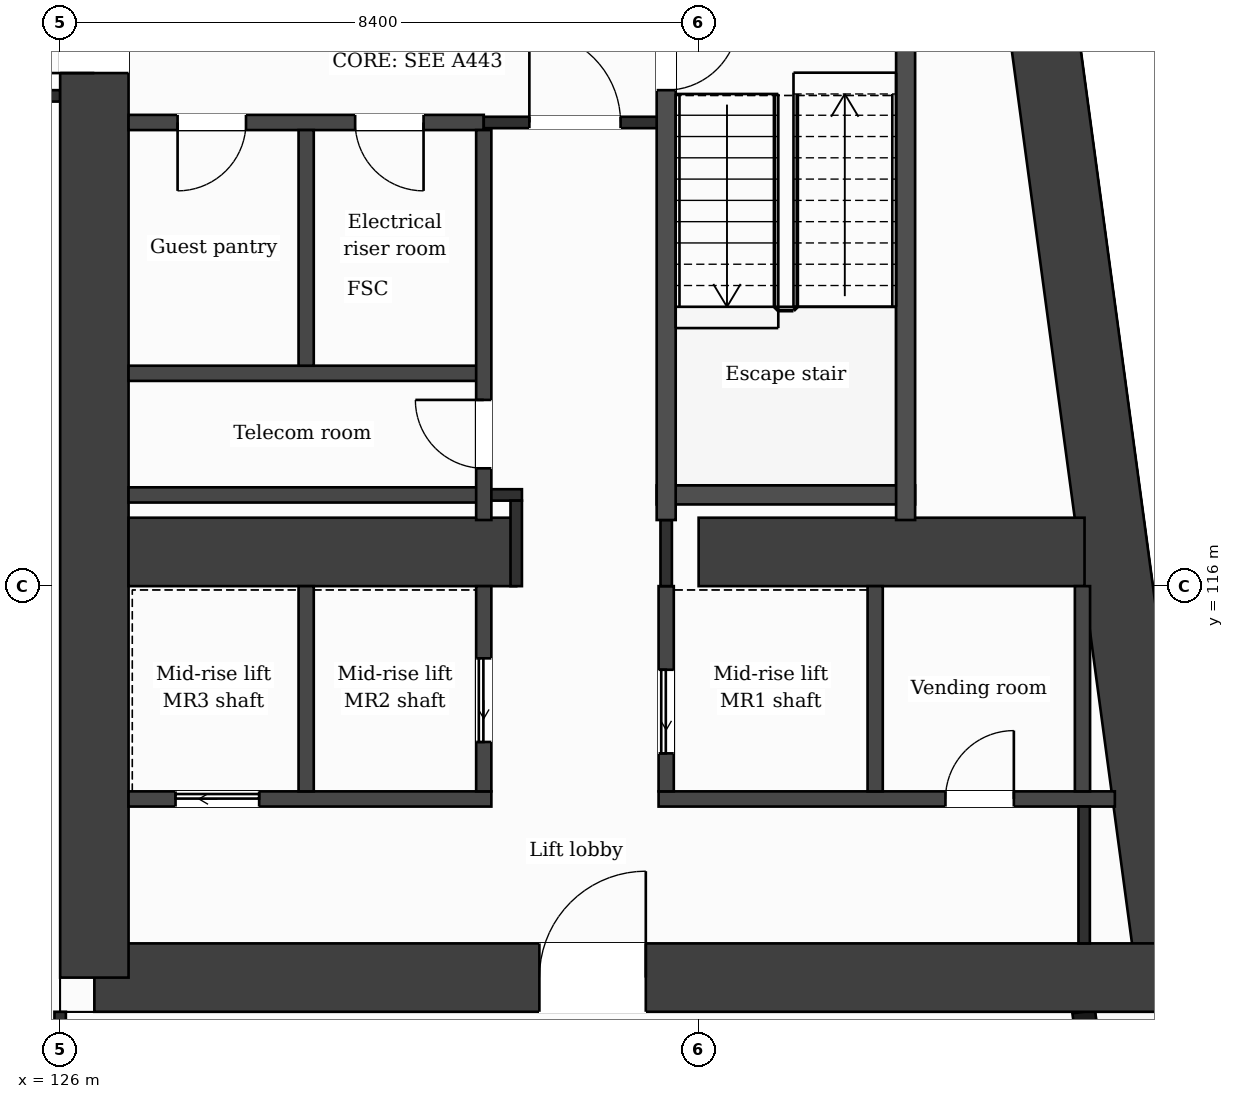
"""IFC4 building model, lengths in metres.
Left out: names, types, materials, properties, quantities, classifications, styles, units other than length and angle.
Written with IfcOpenShell. Run it as: python <this file> out.ifc"""

import sys

from ifc_helpers import new_model, si_unit, direction, frame, frame_2d, origin, place, context, subcontext, project, spatial, rectangle, extrude, element, fill, save


model = new_model("IFC4")
c1 = context("Model", 3, precision=1e-05, world=origin(), true_north=direction((0.0, 1.0)))
c2 = subcontext(c1, "Body", "Model", "MODEL_VIEW")
j1 = project(units=[si_unit("LENGTHUNIT", "METRE"), si_unit("PLANEANGLEUNIT", "RADIAN")], contexts=[c1])
p1 = place(None, origin())
s1 = spatial("IfcSite", under=j1, at=p1, CompositionType="ELEMENT")
p2 = place(p1, origin())
s2 = spatial("IfcBuilding", under=s1, at=p2, CompositionType="ELEMENT")
p3 = place(p2, frame((0.0, 0.0, 177.4)))
s3 = spatial("IfcBuildingStorey", under=s2, at=p3, CompositionType="ELEMENT", Elevation=177.4)
p4 = place(p3, frame((137.776, 131.95, 0.0), z_axis=(0.0, 0.0, 1.0), x_axis=(0.133421759112, -0.991059349482, 0.0)))
e1 = element("IfcWall", 1, at=p4, inside=s3, PredefinedType="SHEAR", context=c2, shape_type="SweptSolid", body=[
    extrude(rectangle(XDim=21.29, YDim=0.9, at=frame_2d((10.645, 0.0))), origin(), (0.0, 0.0, 1.0), 3.7),
])
p5 = place(p3, frame((140.616, 110.85, 0.0), z_axis=(0.0, 0.0, 1.0), x_axis=(-1.0, 0.0, 0.0)))
e2 = element("IfcWall", 2, at=p5, inside=s3, PredefinedType="SHEAR", context=c2, shape_type="SweptSolid", body=[
    extrude(rectangle(XDim=14.166, YDim=0.9, at=frame_2d((7.083, 0.0))), origin(), (0.0, 0.0, 1.0), 3.7),
])
p6 = place(p5, frame((6.911, 0.0, 0.0)))
e3 = element("IfcOpeningElement", 3, at=p6, cuts=e2, PredefinedType="OPENING", context=c2, shape_type="SweptSolid", body=[
    extrude(rectangle(XDim=1.4, YDim=2.1, at=frame_2d((0.7, 1.05))), frame((0.0, 0.46, 0.0), z_axis=(0.0, -1.0, 0.0), x_axis=(1.0, 0.0, 0.0)), (0.0, 0.0, 1.0), 0.92),
])
p7 = place(p3, frame((126.45, 110.85, 0.0), z_axis=(0.0, 0.0, 1.0), x_axis=(0.0, 1.0, 0.0)))
e4 = element("IfcWall", 4, at=p7, inside=s3, PredefinedType="SHEAR", context=c2, shape_type="SweptSolid", body=[
    extrude(rectangle(XDim=21.1, YDim=0.9, at=frame_2d((10.55, 0.0))), origin(), (0.0, 0.0, 1.0), 3.7),
])
p8 = place(p7, frame((11.9, 0.0, 0.0)))
e5 = element("IfcOpeningElement", 5, at=p8, cuts=e4, PredefinedType="OPENING", context=c2, shape_type="SweptSolid", body=[
    extrude(rectangle(XDim=1.4, YDim=2.1, at=frame_2d((0.7, 1.05))), frame((0.0, 0.46, 0.0), z_axis=(0.0, -1.0, 0.0), x_axis=(1.0, 0.0, 0.0)), (0.0, 0.0, 1.0), 0.92),
])
p9 = place(p3, frame((126.9, 116.45, 0.0), z_axis=(0.0, 0.0, 1.0), x_axis=(1.0, 0.0, 0.0)))
e6 = element("IfcWall", 6, at=p9, inside=s3, PredefinedType="SHEAR", context=c2, shape_type="SweptSolid", body=[
    extrude(rectangle(XDim=5.1, YDim=0.9, at=frame_2d((2.55, 0.0))), origin(), (0.0, 0.0, 1.0), 3.7),
])
p10 = place(p3, frame((134.4, 116.45, 0.0), z_axis=(0.0, 0.0, 1.0), x_axis=(1.0, 0.0, 0.0)))
e7 = element("IfcWall", 7, at=p10, inside=s3, PredefinedType="SHEAR", context=c2, shape_type="SweptSolid", body=[
    extrude(rectangle(XDim=5.077, YDim=0.9, at=frame_2d((2.539, 0.0))), origin(), (0.0, 0.0, 1.0), 3.7),
])
p11 = place(p3, frame((140.348, 103.85, 0.0), z_axis=(0.0, 0.0, 1.0), x_axis=(-0.133431549479, 0.991058031401, 0.0)))
e8 = element("IfcWall", 8, at=p11, inside=s3, PredefinedType="SOLIDWALL", context=c2, shape_type="SweptSolid", body=[
    extrude(rectangle(XDim=6.609, YDim=0.3, at=frame_2d((3.304, 0.0))), origin(), (0.0, 0.0, 1.0), 3.38),
])
p12 = place(p11, frame((0.737, 0.0, 0.9)))
e9 = element("IfcOpeningElement", 9, at=p12, cuts=e8, PredefinedType="OPENING", context=c2, shape_type="SweptSolid", body=[
    extrude(rectangle(XDim=1.2, YDim=2.1, at=frame_2d((0.6, 1.05))), frame((0.0, 0.16, 0.0), z_axis=(0.0, -1.0, 0.0), x_axis=(1.0, 0.0, 0.0)), (0.0, 0.0, 1.0), 0.32),
])
p13 = place(p11, frame((3.991, 0.0, 0.0)))
e10 = element("IfcOpeningElement", 10, at=p13, cuts=e8, PredefinedType="OPENING", context=c2, shape_type="SweptSolid", body=[
    extrude(rectangle(XDim=1.2, YDim=2.4, at=frame_2d((0.6, 1.2))), frame((0.0, 0.16, 0.0), z_axis=(0.0, -1.0, 0.0), x_axis=(1.0, 0.0, 0.0)), (0.0, 0.0, 1.0), 0.32),
])
p14 = place(p3, frame((126.9, 113.2, 0.0), z_axis=(0.0, 0.0, 1.0), x_axis=(1.0, 0.0, 0.0)))
e11 = element("IfcWall", 11, at=p14, inside=s3, PredefinedType="PARTITIONING", context=c2, shape_type="SweptSolid", body=[
    extrude(rectangle(XDim=4.773, YDim=0.2, at=frame_2d((2.387, 0.0))), origin(), (0.0, 0.0, 1.0), 3.38),
])
p15 = place(p14, frame((0.618, 0.0, 0.0)))
e12 = element("IfcOpeningElement", 12, at=p15, cuts=e11, PredefinedType="OPENING", context=c2, shape_type="SweptSolid", body=[
    extrude(rectangle(XDim=1.1, YDim=2.1, at=frame_2d((0.55, 1.05))), frame((0.0, 0.11, 0.0), z_axis=(0.0, -1.0, 0.0), x_axis=(1.0, 0.0, 0.0)), (0.0, 0.0, 1.0), 0.22),
])
p16 = place(p3, frame((133.873, 113.2, 0.0), z_axis=(0.0, 0.0, 1.0), x_axis=(1.0, 0.0, 0.0)))
e13 = element("IfcWall", 13, at=p16, inside=s3, PredefinedType="PARTITIONING", context=c2, shape_type="SweptSolid", body=[
    extrude(rectangle(XDim=6.003, YDim=0.2, at=frame_2d((3.001, 0.0))), origin(), (0.0, 0.0, 1.0), 3.38),
])
p17 = place(p16, frame((3.774, 0.0, 0.0)))
e14 = element("IfcOpeningElement", 14, at=p17, cuts=e13, PredefinedType="OPENING", context=c2, shape_type="SweptSolid", body=[
    extrude(rectangle(XDim=0.9, YDim=2.1, at=frame_2d((0.45, 1.05))), frame((0.0, 0.11, 0.0), z_axis=(0.0, -1.0, 0.0), x_axis=(1.0, 0.0, 0.0)), (0.0, 0.0, 1.0), 0.22),
])
p18 = place(p3, frame((126.9, 117.2, 0.0), z_axis=(0.0, 0.0, 1.0), x_axis=(1.0, 0.0, 0.0)))
e15 = element("IfcWall", 15, at=p18, inside=s3, PredefinedType="PARTITIONING", context=c2, shape_type="SweptSolid", body=[
    extrude(rectangle(XDim=4.673, YDim=0.2, at=frame_2d((2.336, 0.0))), origin(), (0.0, 0.0, 1.0), 3.38),
])
p19 = place(p3, frame((131.573, 117.2, 0.0), z_axis=(0.0, 0.0, 1.0), x_axis=(1.0, 0.0, 0.0)))
e16 = element("IfcWall", 16, at=p19, inside=s3, PredefinedType="PARTITIONING", context=c2, shape_type="SweptSolid", body=[
    extrude(rectangle(XDim=0.502, YDim=0.15, at=frame_2d((0.251, 0.0))), origin(), (0.0, 0.0, 1.0), 3.38),
])
p20 = place(p3, frame((133.848, 117.2, 0.0), z_axis=(0.0, 0.0, 1.0), x_axis=(1.0, 0.0, 0.0)))
e17 = element("IfcWall", 17, at=p20, inside=s3, PredefinedType="PARTITIONING", context=c2, shape_type="SweptSolid", body=[
    extrude(rectangle(XDim=3.4, YDim=0.25, at=frame_2d((1.7, 0.0))), origin(), (0.0, 0.0, 1.0), 3.38),
])
p21 = place(p3, frame((126.9, 118.8, 0.0), z_axis=(0.0, 0.0, 1.0), x_axis=(1.0, 0.0, 0.0)))
e18 = element("IfcWall", 18, at=p21, inside=s3, PredefinedType="PARTITIONING", context=c2, shape_type="SweptSolid", body=[
    extrude(rectangle(XDim=4.673, YDim=0.2, at=frame_2d((2.336, 0.0))), origin(), (0.0, 0.0, 1.0), 3.38),
])
p22 = place(p3, frame((126.9, 122.1, 0.0), z_axis=(0.0, 0.0, 1.0), x_axis=(1.0, 0.0, 0.0)))
e19 = element("IfcWall", 19, at=p22, inside=s3, PredefinedType="PARTITIONING", context=c2, shape_type="SweptSolid", body=[
    extrude(rectangle(XDim=4.673, YDim=0.2, at=frame_2d((2.336, 0.0))), origin(), (0.0, 0.0, 1.0), 3.38),
])
p23 = place(p22, frame((2.981, 0.0, 0.0)))
e20 = element("IfcOpeningElement", 20, at=p23, cuts=e19, PredefinedType="OPENING", context=c2, shape_type="SweptSolid", body=[
    extrude(rectangle(XDim=0.9, YDim=2.1, at=frame_2d((0.45, 1.05))), frame((0.0, 0.11, 0.0), z_axis=(0.0, -1.0, 0.0), x_axis=(1.0, 0.0, 0.0)), (0.0, 0.0, 1.0), 0.22),
])
p24 = place(p22, frame((0.645, 0.0, 0.0)))
e21 = element("IfcOpeningElement", 21, at=p24, cuts=e19, PredefinedType="OPENING", context=c2, shape_type="SweptSolid", body=[
    extrude(rectangle(XDim=0.9, YDim=2.1, at=frame_2d((0.45, 1.05))), frame((0.0, 0.11, 0.0), z_axis=(0.0, -1.0, 0.0), x_axis=(1.0, 0.0, 0.0)), (0.0, 0.0, 1.0), 0.22),
])
p25 = place(p3, frame((131.573, 122.1, 0.0), z_axis=(0.0, 0.0, 1.0), x_axis=(1.0, 0.0, 0.0)))
e22 = element("IfcWall", 22, at=p25, inside=s3, PredefinedType="PARTITIONING", context=c2, shape_type="SweptSolid", body=[
    extrude(rectangle(XDim=2.4, YDim=0.15, at=frame_2d((1.2, 0.0))), origin(), (0.0, 0.0, 1.0), 3.38),
])
p26 = place(p25, frame((0.6, 0.0, 0.0)))
e23 = element("IfcOpeningElement", 23, at=p26, cuts=e22, PredefinedType="OPENING", context=c2, shape_type="SweptSolid", body=[
    extrude(rectangle(XDim=1.2, YDim=2.1, at=frame_2d((0.6, 1.05))), frame((0.0, 0.085, 0.0), z_axis=(0.0, -1.0, 0.0), x_axis=(1.0, 0.0, 0.0)), (0.0, 0.0, 1.0), 0.17),
])
p27 = place(p3, frame((100.8, 122.45, 0.0), z_axis=(0.0, 0.0, 1.0), x_axis=(1.0, 0.0, 0.0)))
e24 = element("IfcWall", 24, at=p27, inside=s3, PredefinedType="PARTITIONING", context=c2, shape_type="SweptSolid", body=[
    extrude(rectangle(XDim=25.2, YDim=0.15, at=frame_2d((12.6, 0.0))), origin(), (0.0, 0.0, 1.0), 3.38),
])
p28 = place(p3, frame((126.0, 109.075, 0.0), z_axis=(0.0, 0.0, 1.0), x_axis=(0.0, 1.0, 0.0)))
e25 = element("IfcWall", 25, at=p28, inside=s3, PredefinedType="PARTITIONING", context=c2, shape_type="SweptSolid", body=[
    extrude(rectangle(XDim=1.325, YDim=0.15, at=frame_2d((0.663, 0.0))), origin(), (0.0, 0.0, 1.0), 3.38),
])
p29 = place(p3, frame((129.237, 113.3, 0.0), z_axis=(0.0, 0.0, 1.0), x_axis=(0.0, 1.0, 0.0)))
e26 = element("IfcWall", 26, at=p29, inside=s3, PredefinedType="PARTITIONING", context=c2, shape_type="SweptSolid", body=[
    extrude(rectangle(XDim=2.7, YDim=0.2, at=frame_2d((1.35, 0.0))), origin(), (0.0, 0.0, 1.0), 3.38),
])
p30 = place(p3, frame((129.237, 118.9, 0.0), z_axis=(0.0, 0.0, 1.0), x_axis=(0.0, 1.0, 0.0)))
e27 = element("IfcWall", 27, at=p30, inside=s3, PredefinedType="PARTITIONING", context=c2, shape_type="SweptSolid", body=[
    extrude(rectangle(XDim=3.1, YDim=0.2, at=frame_2d((1.55, 0.0))), origin(), (0.0, 0.0, 1.0), 3.38),
])
p31 = place(p3, frame((131.573, 113.3, 0.0), z_axis=(0.0, 0.0, 1.0), x_axis=(0.0, 1.0, 0.0)))
e28 = element("IfcWall", 28, at=p31, inside=s3, PredefinedType="PARTITIONING", context=c2, shape_type="SweptSolid", body=[
    extrude(rectangle(XDim=2.7, YDim=0.2, at=frame_2d((1.35, 0.0))), origin(), (0.0, 0.0, 1.0), 3.38),
])
p32 = place(p31, frame((0.65, 0.0, 0.0)))
e29 = element("IfcOpeningElement", 29, at=p32, cuts=e28, PredefinedType="OPENING", context=c2, shape_type="SweptSolid", body=[
    extrude(rectangle(XDim=1.1, YDim=2.1, at=frame_2d((0.55, 1.05))), frame((0.0, 0.11, 0.0), z_axis=(0.0, -1.0, 0.0), x_axis=(1.0, 0.0, 0.0)), (0.0, 0.0, 1.0), 0.22),
])
p33 = place(p3, frame((131.573, 116.87, 0.0), z_axis=(0.0, 0.0, 1.0), x_axis=(0.0, 1.0, 0.0)))
e30 = element("IfcWall", 30, at=p33, inside=s3, PredefinedType="PARTITIONING", context=c2, shape_type="SweptSolid", body=[
    extrude(rectangle(XDim=5.13, YDim=0.2, at=frame_2d((2.565, 0.0))), origin(), (0.0, 0.0, 1.0), 3.38),
])
p34 = place(p33, frame((0.68, 0.0, 0.0)))
e31 = element("IfcOpeningElement", 31, at=p34, cuts=e30, PredefinedType="OPENING", context=c2, shape_type="SweptSolid", body=[
    extrude(rectangle(XDim=0.9, YDim=2.1, at=frame_2d((0.45, 1.05))), frame((0.0, 0.11, 0.0), z_axis=(0.0, -1.0, 0.0), x_axis=(1.0, 0.0, 0.0)), (0.0, 0.0, 1.0), 0.22),
])
p35 = place(p3, frame((132.0, 116.0, 0.0), z_axis=(0.0, 0.0, 1.0), x_axis=(0.0, 1.0, 0.0)))
e32 = element("IfcWall", 32, at=p35, inside=s3, PredefinedType="PARTITIONING", context=c2, shape_type="SweptSolid", body=[
    extrude(rectangle(XDim=1.125, YDim=0.15, at=frame_2d((0.562, 0.0))), origin(), (0.0, 0.0, 1.0), 3.38),
])
p36 = place(p3, frame((133.973, 113.3, 0.0), z_axis=(0.0, 0.0, 1.0), x_axis=(0.0, 1.0, 0.0)))
e33 = element("IfcWall", 33, at=p36, inside=s3, PredefinedType="PARTITIONING", context=c2, shape_type="SweptSolid", body=[
    extrude(rectangle(XDim=2.7, YDim=0.2, at=frame_2d((1.35, 0.0))), origin(), (0.0, 0.0, 1.0), 3.38),
])
p37 = place(p36, frame((0.5, 0.0, 0.0)))
e34 = element("IfcOpeningElement", 34, at=p37, cuts=e33, PredefinedType="OPENING", context=c2, shape_type="SweptSolid", body=[
    extrude(rectangle(XDim=1.1, YDim=2.1, at=frame_2d((0.55, 1.05))), frame((0.0, 0.11, 0.0), z_axis=(0.0, -1.0, 0.0), x_axis=(1.0, 0.0, 0.0)), (0.0, 0.0, 1.0), 0.22),
])
p38 = place(p3, frame((133.973, 116.0, 0.0), z_axis=(0.0, 0.0, 1.0), x_axis=(0.0, 1.0, 0.0)))
e35 = element("IfcWall", 35, at=p38, inside=s3, PredefinedType="PARTITIONING", context=c2, shape_type="SweptSolid", body=[
    extrude(rectangle(XDim=0.87, YDim=0.15, at=frame_2d((0.435, 0.0))), origin(), (0.0, 0.0, 1.0), 3.38),
])
p39 = place(p3, frame((133.973, 116.87, 0.0), z_axis=(0.0, 0.0, 1.0), x_axis=(0.0, 1.0, 0.0)))
e36 = element("IfcWall", 36, at=p39, inside=s3, PredefinedType="PARTITIONING", context=c2, shape_type="SweptSolid", body=[
    extrude(rectangle(XDim=6.955, YDim=0.25, at=frame_2d((3.478, 0.0))), origin(), (0.0, 0.0, 1.0), 3.38),
])
p40 = place(p39, frame((5.655, 0.0, 0.0)))
e37 = element("IfcOpeningElement", 37, at=p40, cuts=e36, PredefinedType="OPENING", context=c2, shape_type="SweptSolid", body=[
    extrude(rectangle(XDim=0.95, YDim=2.1, at=frame_2d((0.475, 1.05))), frame((0.0, 0.135, 0.0), z_axis=(0.0, -1.0, 0.0), x_axis=(1.0, 0.0, 0.0)), (0.0, 0.0, 1.0), 0.27),
])
p41 = place(p3, frame((136.722, 113.3, 0.0), z_axis=(0.0, 0.0, 1.0), x_axis=(0.0, 1.0, 0.0)))
e38 = element("IfcWall", 38, at=p41, inside=s3, PredefinedType="PARTITIONING", context=c2, shape_type="SweptSolid", body=[
    extrude(rectangle(XDim=2.7, YDim=0.2, at=frame_2d((1.35, 0.0))), origin(), (0.0, 0.0, 1.0), 3.38),
])
p42 = place(p3, frame((137.123, 116.87, 0.0), z_axis=(0.0, 0.0, 1.0), x_axis=(0.0, 1.0, 0.0)))
e39 = element("IfcWall", 39, at=p42, inside=s3, PredefinedType="PARTITIONING", context=c2, shape_type="SweptSolid", body=[
    extrude(rectangle(XDim=6.955, YDim=0.25, at=frame_2d((3.478, 0.0))), origin(), (0.0, 0.0, 1.0), 3.38),
])
p43 = place(p3, frame((139.45, 113.3, 0.0), z_axis=(0.0, 0.0, 1.0), x_axis=(0.0, 1.0, 0.0)))
e40 = element("IfcWall", 40, at=p43, inside=s3, PredefinedType="PARTITIONING", context=c2, shape_type="SweptSolid", body=[
    extrude(rectangle(XDim=2.7, YDim=0.2, at=frame_2d((1.35, 0.0))), origin(), (0.0, 0.0, 1.0), 3.38),
])
p44 = place(p3, frame((139.472, 111.3, 0.0), z_axis=(0.0, 0.0, 1.0), x_axis=(0.0, 1.0, 0.0)))
e41 = element("IfcWall", 41, at=p44, inside=s3, PredefinedType="PARTITIONING", context=c2, shape_type="SweptSolid", body=[
    extrude(rectangle(XDim=1.8, YDim=0.15, at=frame_2d((0.9, 0.0))), origin(), (0.0, 0.0, 1.0), 3.38),
])
p45 = place(p26, origin())
e42 = element("IfcDoor", 42, at=p45, inside=s3, OperationType="SINGLE_SWING_LEFT", PredefinedType="DOOR", context=c2, shape_type="SweptSolid", body=[
    extrude(rectangle(XDim=1.2, YDim=2.1, at=frame_2d((0.6, 1.05))), frame((0.0, 0.025, 0.0), z_axis=(0.0, -1.0, 0.0), x_axis=(1.0, 0.0, 0.0)), (0.0, 0.0, 1.0), 0.05),
])
fill(e23, e42)
p46 = place(p23, origin())
e43 = element("IfcDoor", 43, at=p46, inside=s3, OperationType="SINGLE_SWING_RIGHT", PredefinedType="DOOR", context=c2, shape_type="SweptSolid", body=[
    extrude(rectangle(XDim=0.9, YDim=2.1, at=frame_2d((0.45, 1.05))), frame((0.0, 0.025, 0.0), z_axis=(0.0, -1.0, 0.0), x_axis=(1.0, 0.0, 0.0)), (0.0, 0.0, 1.0), 0.05),
])
fill(e20, e43)
p47 = place(p24, origin())
e44 = element("IfcDoor", 44, at=p47, inside=s3, OperationType="SINGLE_SWING_LEFT", PredefinedType="DOOR", context=c2, shape_type="SweptSolid", body=[
    extrude(rectangle(XDim=0.9, YDim=2.1, at=frame_2d((0.45, 1.05))), frame((0.0, 0.025, 0.0), z_axis=(0.0, -1.0, 0.0), x_axis=(1.0, 0.0, 0.0)), (0.0, 0.0, 1.0), 0.05),
])
fill(e21, e44)
p48 = place(p40, origin())
e45 = element("IfcDoor", 45, at=p48, inside=s3, OperationType="SINGLE_SWING_RIGHT", PredefinedType="DOOR", context=c2, shape_type="SweptSolid", body=[
    extrude(rectangle(XDim=0.95, YDim=2.1, at=frame_2d((0.475, 1.05))), frame((0.0, 0.025, 0.0), z_axis=(0.0, -1.0, 0.0), x_axis=(1.0, 0.0, 0.0)), (0.0, 0.0, 1.0), 0.05),
])
fill(e37, e45)
p49 = place(p34, origin())
e46 = element("IfcDoor", 46, at=p49, inside=s3, OperationType="SINGLE_SWING_RIGHT", PredefinedType="DOOR", context=c2, shape_type="SweptSolid", body=[
    extrude(rectangle(XDim=0.9, YDim=2.1, at=frame_2d((0.45, 1.05))), frame((0.0, 0.025, 0.0), z_axis=(0.0, -1.0, 0.0), x_axis=(1.0, 0.0, 0.0)), (0.0, 0.0, 1.0), 0.05),
])
fill(e31, e46)
p50 = place(p37, origin())
e47 = element("IfcDoor", 47, at=p50, inside=s3, OperationType="SLIDING_TO_LEFT", PredefinedType="DOOR", context=c2, shape_type="SweptSolid", body=[
    extrude(rectangle(XDim=1.1, YDim=2.1, at=frame_2d((0.55, 1.05))), frame((0.0, 0.025, 0.0), z_axis=(0.0, -1.0, 0.0), x_axis=(1.0, 0.0, 0.0)), (0.0, 0.0, 1.0), 0.05),
])
fill(e34, e47)
p51 = place(p32, origin())
e48 = element("IfcDoor", 48, at=p51, inside=s3, OperationType="SLIDING_TO_LEFT", PredefinedType="DOOR", context=c2, shape_type="SweptSolid", body=[
    extrude(rectangle(XDim=1.1, YDim=2.1, at=frame_2d((0.55, 1.05))), frame((0.0, 0.025, 0.0), z_axis=(0.0, -1.0, 0.0), x_axis=(1.0, 0.0, 0.0)), (0.0, 0.0, 1.0), 0.05),
])
fill(e29, e48)
p52 = place(p15, origin())
e49 = element("IfcDoor", 49, at=p52, inside=s3, OperationType="SLIDING_TO_LEFT", PredefinedType="DOOR", context=c2, shape_type="SweptSolid", body=[
    extrude(rectangle(XDim=1.1, YDim=2.1, at=frame_2d((0.55, 1.05))), frame((0.0, 0.025, 0.0), z_axis=(0.0, -1.0, 0.0), x_axis=(1.0, 0.0, 0.0)), (0.0, 0.0, 1.0), 0.05),
])
fill(e12, e49)
p53 = place(p17, origin())
e50 = element("IfcDoor", 50, at=p53, inside=s3, OperationType="SINGLE_SWING_RIGHT", PredefinedType="DOOR", context=c2, shape_type="SweptSolid", body=[
    extrude(rectangle(XDim=0.9, YDim=2.1, at=frame_2d((0.45, 1.05))), frame((0.0, 0.025, 0.0), z_axis=(0.0, -1.0, 0.0), x_axis=(1.0, 0.0, 0.0)), (0.0, 0.0, 1.0), 0.05),
])
fill(e14, e50)
p54 = place(p6, origin())
e51 = element("IfcDoor", 51, at=p54, inside=s3, OperationType="SINGLE_SWING_LEFT", PredefinedType="DOOR", context=c2, shape_type="SweptSolid", body=[
    extrude(rectangle(XDim=1.4, YDim=2.1, at=frame_2d((0.7, 1.05))), frame((0.0, 0.025, 0.0), z_axis=(0.0, -1.0, 0.0), x_axis=(1.0, 0.0, 0.0)), (0.0, 0.0, 1.0), 0.05),
])
fill(e3, e51)
p55 = place(p8, origin())
e52 = element("IfcDoor", 52, at=p55, inside=s3, OperationType="SINGLE_SWING_LEFT", PredefinedType="DOOR", context=c2, shape_type="SweptSolid", body=[
    extrude(rectangle(XDim=1.4, YDim=2.1, at=frame_2d((0.7, 1.05))), frame((0.0, 0.025, 0.0), z_axis=(0.0, -1.0, 0.0), x_axis=(1.0, 0.0, 0.0)), (0.0, 0.0, 1.0), 0.05),
])
fill(e5, e52)
save(model, sys.argv[1])
